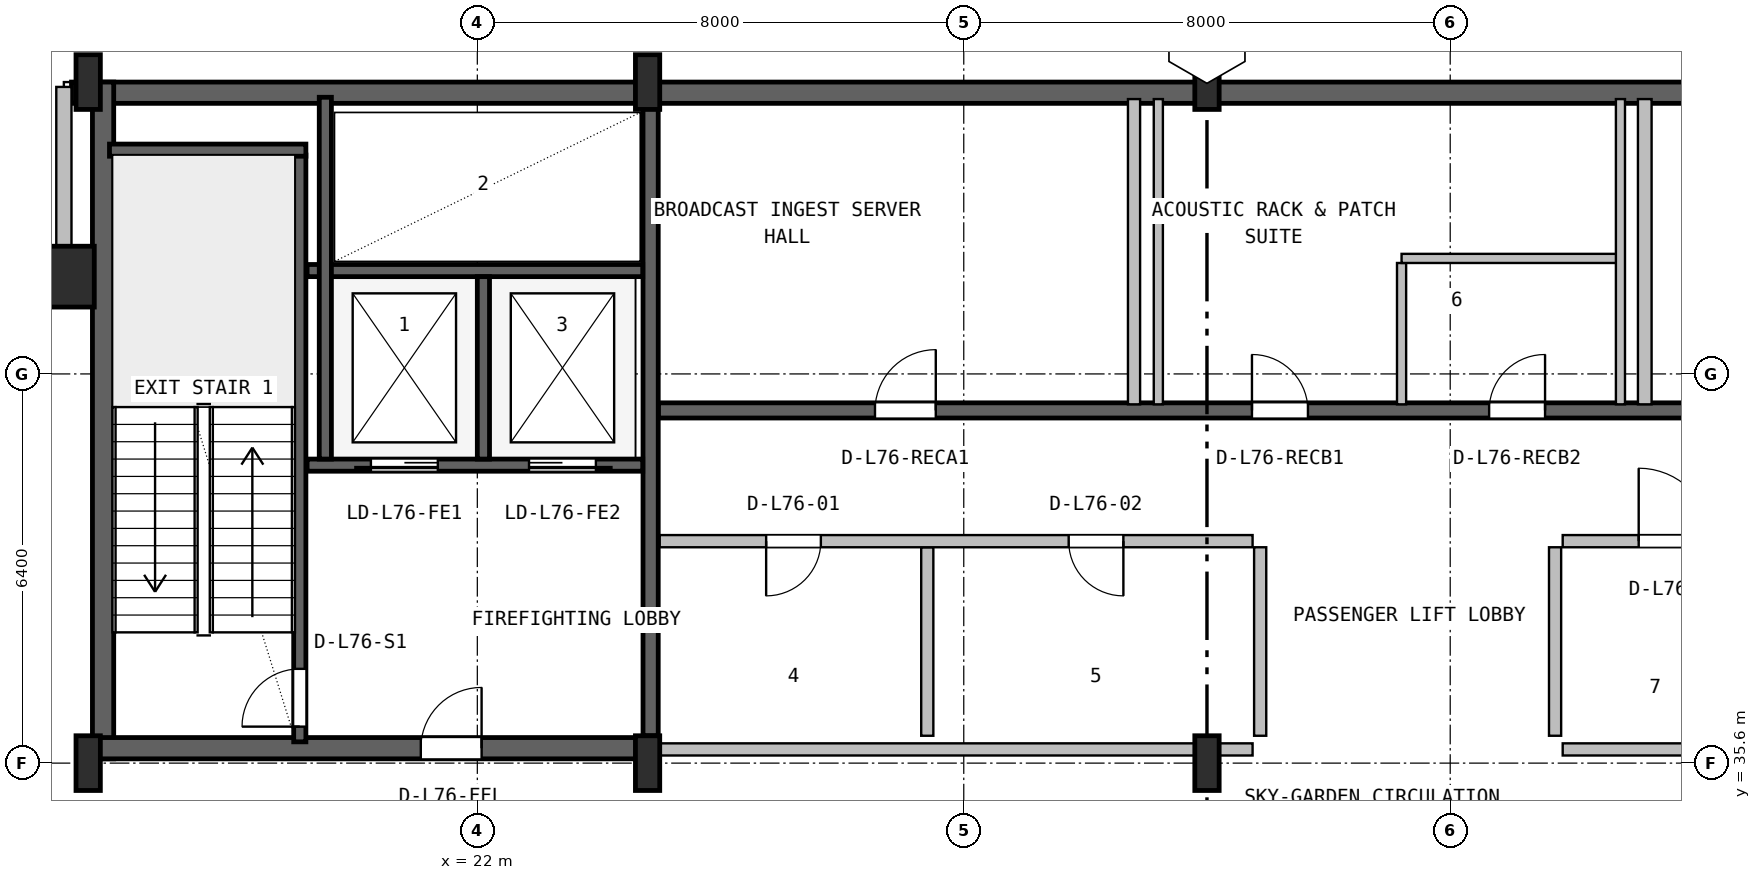
"""IFC4 building model, lengths in metres.
Left out: names, types, materials, properties, quantities, classifications, styles, units other than length and angle.
Written with IfcOpenShell. Run it as: python <this file> out.ifc"""

import sys

from ifc_helpers import new_model, si_unit, direction, frame, frame_2d, origin, origin_2d, place, context, subcontext, project, spatial, rectangle, hollow_rectangle, i_section, extrude, source, transform, mapped, element, fill, save


model = new_model("IFC4")
c1 = context("Model", 3, precision=1e-05, world=origin(), true_north=direction((0.0, 1.0)))
c2 = subcontext(c1, "Body", "Model", "MODEL_VIEW")
j1 = project(units=[si_unit("LENGTHUNIT", "METRE"), si_unit("PLANEANGLEUNIT", "RADIAN")], contexts=[c1])
p1 = place(None, origin())
s1 = spatial("IfcSite", under=j1, at=p1, CompositionType="ELEMENT")
p2 = place(p1, origin())
s2 = spatial("IfcBuilding", under=s1, at=p2, CompositionType="ELEMENT")
p3 = place(p2, frame((0.0, 0.0, 305.0)))
s3 = spatial("IfcBuildingStorey", under=s2, at=p3, CompositionType="ELEMENT", Elevation=305.0)
p4 = place(p3, frame((15.325, 46.625, 0.0), z_axis=(0.0, 0.0, 1.0), x_axis=(1.0, 0.0, 0.0)))
e1 = element("IfcWall", 1, at=p4, inside=s3, PredefinedType="SHEAR", context=c2, shape_type="SweptSolid", body=[
    extrude(rectangle(XDim=37.35, YDim=0.35, at=frame_2d((18.675, 0.0))), origin(), (0.0, 0.0, 1.0), 4.52),
])
p5 = place(p3, frame((15.845, 35.67, 0.0), z_axis=(0.0, 0.0, 1.0), x_axis=(0.0, 1.0, 0.0)))
e2 = element("IfcWall", 2, at=p5, inside=s3, PredefinedType="SHEAR", context=c2, shape_type="SweptSolid", body=[
    extrude(rectangle(XDim=11.13, YDim=0.35, at=frame_2d((5.565, 0.0))), origin(), (0.0, 0.0, 1.0), 4.52),
])
p6 = place(p3, frame((15.67, 35.845, 0.0), z_axis=(0.0, 0.0, 1.0), x_axis=(1.0, 0.0, 0.0)))
e3 = element("IfcWall", 3, at=p6, inside=s3, PredefinedType="SHEAR", context=c2, shape_type="SweptSolid", body=[
    extrude(rectangle(XDim=9.13, YDim=0.35, at=frame_2d((4.565, 0.0))), origin(), (0.0, 0.0, 1.0), 4.52),
])
p7 = place(p6, frame((5.4, 0.0, 0.0)))
e4 = element("IfcOpeningElement", 4, at=p7, cuts=e3, PredefinedType="OPENING", context=c2, shape_type="SweptSolid", body=[
    extrude(rectangle(XDim=1.0, YDim=2.1, at=frame_2d((0.5, 1.05))), frame((0.0, 0.185, 0.0), z_axis=(0.0, -1.0, 0.0), x_axis=(1.0, 0.0, 0.0)), (0.0, 0.0, 1.0), 0.37),
])
m1 = source(origin(), c2, "Body", "SweptSolid", [
    extrude(i_section(OverallWidth=0.4, OverallDepth=0.9, WebThickness=0.016, FlangeThickness=0.028, FilletRadius=0.016, at=origin_2d()), origin(), (0.0, 0.0, 1.0), 4.8),
])
for number, where, z_axis, x_axis in (
    (5, (15.6, 35.6, 0.0), (0.0, 0.0, 1.0), (1.0, 0.0, 0.0)),
    (6, (15.6, 46.8, 0.0), (0.0, 0.0, 1.0), (1.0, 0.0, 0.0)),
    (7, (24.8, 35.6, 0.0), (0.0, 0.0, 1.0), (1.0, 0.0, 0.0)),
    (8, (24.8, 46.8, 0.0), (0.0, 0.0, 1.0), (1.0, 0.0, 0.0)),
    (9, (34.0, 35.6, 0.0), (0.0, 0.0, 1.0), (1.0, 0.0, 0.0)),
    (10, (34.0, 46.8, 0.0), (0.0, 0.0, 1.0), (1.0, 0.0, 0.0)),
):
    element("IfcColumn", number, at=place(p3, frame(where, z_axis=z_axis, x_axis=x_axis)), inside=s3, PredefinedType="COLUMN", context=c2, shape_type="MappedRepresentation", body=[
        mapped(m1, transform((0.0, 0.0, 0.0), x_axis=(1.0, 0.0, 0.0), y_axis=(0.0, 1.0, 0.0), z_axis=(0.0, 0.0, 1.0), scale=1.0)),
    ])
m2 = source(origin(), c2, "Body", "SweptSolid", [
    extrude(hollow_rectangle(XDim=1.0, YDim=1.0, WallThickness=0.04, at=origin_2d()), origin(), (0.0, 0.0, 1.0), 4.8),
])
p8 = place(p3, frame((15.2, 43.6, 0.0), z_axis=(0.0, 0.0, 1.0), x_axis=(1.0, 0.0, 0.0)))
e11 = element("IfcColumn", 11, at=p8, inside=s3, PredefinedType="COLUMN", context=c2, shape_type="MappedRepresentation", body=[
    mapped(m2, transform((0.0, 0.0, 0.0), x_axis=(1.0, 0.0, 0.0), y_axis=(0.0, 1.0, 0.0), z_axis=(0.0, 0.0, 1.0), scale=1.0)),
])
p9 = place(p3, frame((12.08, 43.6, 0.0), z_axis=(0.0, 0.0, 1.0), x_axis=(1.0, 0.0, 0.0)))
e12 = element("IfcWall", 12, at=p9, inside=s3, PredefinedType="SOLIDWALL", context=c2, shape_type="SweptSolid", body=[
    extrude(rectangle(XDim=2.99, YDim=0.25, at=frame_2d((1.495, 0.0))), origin(), (0.0, 0.0, 1.0), 4.5),
])
p10 = place(p3, frame((15.2, 43.52, 0.0), z_axis=(0.0, 0.0, 1.0), x_axis=(0.0, 1.0, 0.0)))
e13 = element("IfcWall", 13, at=p10, inside=s3, PredefinedType="SOLIDWALL", context=c2, shape_type="SweptSolid", body=[
    extrude(rectangle(XDim=3.2, YDim=0.25, at=frame_2d((1.6, 0.0))), origin(), (0.0, 0.0, 1.0), 4.141),
])
p11 = place(p3, frame((19.08, 35.95, 0.0), z_axis=(0.0, 0.0, 1.0), x_axis=(0.0, 1.0, 0.0)))
e14 = element("IfcWall", 14, at=p11, inside=s3, PredefinedType="SHEAR", context=c2, shape_type="SweptSolid", body=[
    extrude(rectangle(XDim=9.65, YDim=0.2, at=frame_2d((4.825, 0.0))), origin(), (0.0, 0.0, 1.0), 4.52),
])
p12 = place(p11, frame((0.25, 0.0, 0.0)))
e15 = element("IfcOpeningElement", 15, at=p12, cuts=e14, PredefinedType="OPENING", context=c2, shape_type="SweptSolid", body=[
    extrude(rectangle(XDim=0.95, YDim=2.1, at=frame_2d((0.475, 1.05))), frame((0.0, 0.11, 0.0), z_axis=(0.0, -1.0, 0.0), x_axis=(1.0, 0.0, 0.0)), (0.0, 0.0, 1.0), 0.22),
])
p13 = place(p3, frame((15.95, 45.68, 0.0), z_axis=(0.0, 0.0, 1.0), x_axis=(1.0, 0.0, 0.0)))
e16 = element("IfcWall", 16, at=p13, inside=s3, PredefinedType="SHEAR", context=c2, shape_type="SweptSolid", body=[
    extrude(rectangle(XDim=3.23, YDim=0.2, at=frame_2d((1.615, 0.0))), origin(), (0.0, 0.0, 1.0), 4.52),
])
p14 = place(p3, frame((24.85, 36.05, 0.0), z_axis=(0.0, 0.0, 1.0), x_axis=(0.0, 1.0, 0.0)))
e17 = element("IfcWall", 17, at=p14, inside=s3, PredefinedType="SHEAR", context=c2, shape_type="SweptSolid", body=[
    extrude(rectangle(XDim=10.45, YDim=0.25, at=frame_2d((5.225, 0.0))), origin(), (0.0, 0.0, 1.0), 4.52),
])
p15 = place(p3, frame((19.2, 40.5, 0.0), z_axis=(0.0, 0.0, 1.0), x_axis=(1.0, 0.0, 0.0)))
e18 = element("IfcWall", 18, at=p15, inside=s3, PredefinedType="SHEAR", context=c2, shape_type="SweptSolid", body=[
    extrude(rectangle(XDim=5.52, YDim=0.2, at=frame_2d((2.76, 0.0))), origin(), (0.0, 0.0, 1.0), 4.52),
])
p16 = place(p15, frame((1.05, 0.0, 0.0)))
e19 = element("IfcOpeningElement", 19, at=p16, cuts=e18, PredefinedType="OPENING", context=c2, shape_type="SweptSolid", body=[
    extrude(rectangle(XDim=1.1, YDim=2.18, at=frame_2d((0.55, 1.09))), frame((0.0, 0.11, 0.0), z_axis=(0.0, -1.0, 0.0), x_axis=(1.0, 0.0, 0.0)), (0.0, 0.0, 1.0), 0.22),
])
p17 = place(p15, frame((3.65, 0.0, 0.0)))
e20 = element("IfcOpeningElement", 20, at=p17, cuts=e18, PredefinedType="OPENING", context=c2, shape_type="SweptSolid", body=[
    extrude(rectangle(XDim=1.1, YDim=2.18, at=frame_2d((0.55, 1.09))), frame((0.0, 0.11, 0.0), z_axis=(0.0, -1.0, 0.0), x_axis=(1.0, 0.0, 0.0)), (0.0, 0.0, 1.0), 0.22),
])
p18 = place(p3, frame((19.2, 43.7, 0.0), z_axis=(0.0, 0.0, 1.0), x_axis=(1.0, 0.0, 0.0)))
e21 = element("IfcWall", 21, at=p18, inside=s3, PredefinedType="SHEAR", context=c2, shape_type="SweptSolid", body=[
    extrude(rectangle(XDim=5.52, YDim=0.2, at=frame_2d((2.76, 0.0))), origin(), (0.0, 0.0, 1.0), 4.52),
])
p19 = place(p3, frame((22.1, 40.6, 0.0), z_axis=(0.0, 0.0, 1.0), x_axis=(0.0, 1.0, 0.0)))
e22 = element("IfcWall", 22, at=p19, inside=s3, PredefinedType="SHEAR", context=c2, shape_type="SweptSolid", body=[
    extrude(rectangle(XDim=3.0, YDim=0.2, at=frame_2d((1.5, 0.0))), origin(), (0.0, 0.0, 1.0), 4.52),
])
p20 = place(p3, frame((19.5, 40.6, 0.0), z_axis=(0.0, 0.0, 1.0), x_axis=(0.0, 1.0, 0.0)))
e23 = element("IfcWall", 23, at=p20, inside=s3, PredefinedType="SHEAR", context=c2, shape_type="SweptSolid", body=[
    extrude(rectangle(XDim=5.95, YDim=0.2, at=frame_2d((2.975, 0.0))), origin(), (0.0, 0.0, 1.0), 4.52),
])
p21 = place(p3, frame((24.98, 41.4, 0.0), z_axis=(0.0, 0.0, 1.0), x_axis=(1.0, 0.0, 0.0)))
e24 = element("IfcWall", 24, at=p21, inside=s3, PredefinedType="SHEAR", context=c2, shape_type="SweptSolid", body=[
    extrude(rectangle(XDim=23.82, YDim=0.25, at=frame_2d((11.91, 0.0))), origin(), (0.0, 0.0, 1.0), 4.52),
])
p22 = place(p21, frame((3.56, 0.0, 0.0)))
e25 = element("IfcOpeningElement", 25, at=p22, cuts=e24, PredefinedType="OPENING", context=c2, shape_type="SweptSolid", body=[
    extrude(rectangle(XDim=1.0, YDim=2.08, at=frame_2d((0.5, 1.04))), frame((0.0, 0.135, 0.0), z_axis=(0.0, -1.0, 0.0), x_axis=(1.0, 0.0, 0.0)), (0.0, 0.0, 1.0), 0.27),
])
p23 = place(p21, frame((9.76, 0.0, 0.0)))
e26 = element("IfcOpeningElement", 26, at=p23, cuts=e24, PredefinedType="OPENING", context=c2, shape_type="SweptSolid", body=[
    extrude(rectangle(XDim=0.92, YDim=2.08, at=frame_2d((0.46, 1.04))), frame((0.0, 0.135, 0.0), z_axis=(0.0, -1.0, 0.0), x_axis=(1.0, 0.0, 0.0)), (0.0, 0.0, 1.0), 0.27),
])
p24 = place(p21, frame((13.66, 0.0, 0.0)))
e27 = element("IfcOpeningElement", 27, at=p24, cuts=e24, PredefinedType="OPENING", context=c2, shape_type="SweptSolid", body=[
    extrude(rectangle(XDim=0.92, YDim=2.08, at=frame_2d((0.46, 1.04))), frame((0.0, 0.135, 0.0), z_axis=(0.0, -1.0, 0.0), x_axis=(1.0, 0.0, 0.0)), (0.0, 0.0, 1.0), 0.27),
])
p25 = place(p21, frame((19.56, 0.0, 0.0)))
e28 = element("IfcOpeningElement", 28, at=p25, cuts=e24, PredefinedType="OPENING", context=c2, shape_type="SweptSolid", body=[
    extrude(rectangle(XDim=0.92, YDim=2.08, at=frame_2d((0.46, 1.04))), frame((0.0, 0.135, 0.0), z_axis=(0.0, -1.0, 0.0), x_axis=(1.0, 0.0, 0.0)), (0.0, 0.0, 1.0), 0.27),
])
p26 = place(p3, frame((25.0, 35.825, 0.0), z_axis=(0.0, 0.0, 1.0), x_axis=(1.0, 0.0, 0.0)))
e29 = element("IfcWall", 29, at=p26, inside=s3, PredefinedType="PLUMBINGWALL", context=c2, shape_type="SweptSolid", body=[
    extrude(rectangle(XDim=9.75, YDim=0.2, at=frame_2d((4.875, 0.0))), origin(), (0.0, 0.0, 1.0), 3.545),
])
p27 = place(p3, frame((29.4, 36.05, 0.0), z_axis=(0.0, 0.0, 1.0), x_axis=(0.0, 1.0, 0.0)))
e30 = element("IfcWall", 30, at=p27, inside=s3, PredefinedType="PLUMBINGWALL", context=c2, shape_type="SweptSolid", body=[
    extrude(rectangle(XDim=3.1, YDim=0.2, at=frame_2d((1.55, 0.0))), origin(), (0.0, 0.0, 1.0), 4.5),
])
p28 = place(p3, frame((25.0, 39.25, 0.0), z_axis=(0.0, 0.0, 1.0), x_axis=(1.0, 0.0, 0.0)))
e31 = element("IfcWall", 31, at=p28, inside=s3, PredefinedType="PLUMBINGWALL", context=c2, shape_type="SweptSolid", body=[
    extrude(rectangle(XDim=9.75, YDim=0.2, at=frame_2d((4.875, 0.0))), origin(), (0.0, 0.0, 1.0), 4.5),
])
p29 = place(p28, frame((1.75, 0.0, 0.0)))
e32 = element("IfcOpeningElement", 32, at=p29, cuts=e31, PredefinedType="OPENING", context=c2, shape_type="SweptSolid", body=[
    extrude(rectangle(XDim=0.9, YDim=2.06, at=frame_2d((0.45, 1.03))), frame((0.0, 0.11, 0.0), z_axis=(0.0, -1.0, 0.0), x_axis=(1.0, 0.0, 0.0)), (0.0, 0.0, 1.0), 0.22),
])
p30 = place(p28, frame((6.725, 0.0, 0.0)))
e33 = element("IfcOpeningElement", 33, at=p30, cuts=e31, PredefinedType="OPENING", context=c2, shape_type="SweptSolid", body=[
    extrude(rectangle(XDim=0.9, YDim=2.06, at=frame_2d((0.45, 1.03))), frame((0.0, 0.11, 0.0), z_axis=(0.0, -1.0, 0.0), x_axis=(1.0, 0.0, 0.0)), (0.0, 0.0, 1.0), 0.22),
])
p31 = place(p3, frame((34.875, 36.05, 0.0), z_axis=(0.0, 0.0, 1.0), x_axis=(0.0, 1.0, 0.0)))
e34 = element("IfcWall", 34, at=p31, inside=s3, PredefinedType="PLUMBINGWALL", context=c2, shape_type="SweptSolid", body=[
    extrude(rectangle(XDim=3.1, YDim=0.2, at=frame_2d((1.55, 0.0))), origin(), (0.0, 0.0, 1.0), 4.5),
])
p32 = place(p3, frame((39.85, 35.825, 0.0), z_axis=(0.0, 0.0, 1.0), x_axis=(1.0, 0.0, 0.0)))
e35 = element("IfcWall", 35, at=p32, inside=s3, PredefinedType="SOLIDWALL", context=c2, shape_type="SweptSolid", body=[
    extrude(rectangle(XDim=3.7, YDim=0.2, at=frame_2d((1.85, 0.0))), origin(), (0.0, 0.0, 1.0), 3.545),
])
p33 = place(p3, frame((39.85, 39.25, 0.0), z_axis=(0.0, 0.0, 1.0), x_axis=(1.0, 0.0, 0.0)))
e36 = element("IfcWall", 36, at=p33, inside=s3, PredefinedType="SOLIDWALL", context=c2, shape_type="SweptSolid", body=[
    extrude(rectangle(XDim=3.7, YDim=0.2, at=frame_2d((1.85, 0.0))), origin(), (0.0, 0.0, 1.0), 4.5),
])
p34 = place(p33, frame((1.25, 0.0, 0.0)))
e37 = element("IfcOpeningElement", 37, at=p34, cuts=e36, PredefinedType="OPENING", context=c2, shape_type="SweptSolid", body=[
    extrude(rectangle(XDim=1.2, YDim=2.1, at=frame_2d((0.6, 1.05))), frame((0.0, 0.11, 0.0), z_axis=(0.0, -1.0, 0.0), x_axis=(1.0, 0.0, 0.0)), (0.0, 0.0, 1.0), 0.22),
])
p35 = place(p3, frame((39.725, 36.05, 0.0), z_axis=(0.0, 0.0, 1.0), x_axis=(0.0, 1.0, 0.0)))
e38 = element("IfcWall", 38, at=p35, inside=s3, PredefinedType="SOLIDWALL", context=c2, shape_type="SweptSolid", body=[
    extrude(rectangle(XDim=3.1, YDim=0.2, at=frame_2d((1.55, 0.0))), origin(), (0.0, 0.0, 1.0), 4.5),
])
p36 = place(p3, frame((32.8, 41.5, 0.0), z_axis=(0.0, 0.0, 1.0), x_axis=(0.0, 1.0, 0.0)))
e39 = element("IfcWall", 39, at=p36, inside=s3, PredefinedType="SOLIDWALL", context=c2, shape_type="SweptSolid", body=[
    extrude(rectangle(XDim=5.02, YDim=0.2, at=frame_2d((2.51, 0.0))), origin(), (0.0, 0.0, 1.0), 4.5),
])
p37 = place(p3, frame((37.2, 41.5, 0.0), z_axis=(0.0, 0.0, 1.0), x_axis=(0.0, 1.0, 0.0)))
e40 = element("IfcWall", 40, at=p37, inside=s3, PredefinedType="PARTITIONING", context=c2, shape_type="SweptSolid", body=[
    extrude(rectangle(XDim=2.325, YDim=0.15, at=frame_2d((1.163, 0.0))), origin(), (0.0, 0.0, 1.0), 4.5),
])
p38 = place(p3, frame((37.2, 43.9, 0.0), z_axis=(0.0, 0.0, 1.0), x_axis=(1.0, 0.0, 0.0)))
e41 = element("IfcWall", 41, at=p38, inside=s3, PredefinedType="PARTITIONING", context=c2, shape_type="SweptSolid", body=[
    extrude(rectangle(XDim=3.6, YDim=0.15, at=frame_2d((1.8, 0.0))), origin(), (0.0, 0.0, 1.0), 4.5),
])
for number, where, z_axis, x_axis in (
    (42, (40.8, 41.5, 0.0), (0.0, 0.0, 1.0), (0.0, 1.0, 0.0)),
    (43, (33.2, 41.5, 0.0), (0.0, 0.0, 1.0), (0.0, 1.0, 0.0)),
):
    element("IfcWall", number, at=place(p3, frame(where, z_axis=z_axis, x_axis=x_axis)), inside=s3, PredefinedType="PARTITIONING", context=c2, shape_type="SweptSolid", body=[
        extrude(rectangle(XDim=5.02, YDim=0.15, at=frame_2d((2.51, 0.0))), origin(), (0.0, 0.0, 1.0), 4.5),
    ])
p39 = place(p3, frame((41.2, 41.5, 0.0), z_axis=(0.0, 0.0, 1.0), x_axis=(0.0, 1.0, 0.0)))
e44 = element("IfcWall", 44, at=p39, inside=s3, PredefinedType="PARTITIONING", context=c2, shape_type="SweptSolid", body=[
    extrude(rectangle(XDim=5.02, YDim=0.225, at=frame_2d((2.51, 0.0))), origin(), (0.0, 0.0, 1.0), 4.5),
])
m3 = source(origin(), c2, "Body", "SweptSolid", [
    extrude(rectangle(XDim=0.95, YDim=2.1, at=frame_2d((0.475, 1.05))), frame((0.0, 0.025, 0.0), z_axis=(0.0, -1.0, 0.0), x_axis=(1.0, 0.0, 0.0)), (0.0, 0.0, 1.0), 0.05),
])
p40 = place(p12, origin())
e45 = element("IfcDoor", 45, at=p40, inside=s3, OperationType="SINGLE_SWING_LEFT", PredefinedType="DOOR", context=c2, shape_type="MappedRepresentation", body=[
    mapped(m3, transform((0.0, 0.0, 0.0), x_axis=(1.0, 0.0, 0.0), y_axis=(0.0, 1.0, 0.0), z_axis=(0.0, 0.0, 1.0), scale=1.0)),
])
fill(e15, e45)
m4 = source(origin(), c2, "Body", "SweptSolid", [
    extrude(rectangle(XDim=1.0, YDim=2.1, at=frame_2d((0.5, 1.05))), frame((0.0, 0.025, 0.0), z_axis=(0.0, -1.0, 0.0), x_axis=(1.0, 0.0, 0.0)), (0.0, 0.0, 1.0), 0.05),
])
p41 = place(p7, origin())
e46 = element("IfcDoor", 46, at=p41, inside=s3, OperationType="SINGLE_SWING_RIGHT", PredefinedType="DOOR", context=c2, shape_type="MappedRepresentation", body=[
    mapped(m4, transform((0.0, 0.0, 0.0), x_axis=(1.0, 0.0, 0.0), y_axis=(0.0, 1.0, 0.0), z_axis=(0.0, 0.0, 1.0), scale=1.0)),
])
fill(e4, e46)
m5 = source(origin(), c2, "Body", "SweptSolid", [
    extrude(rectangle(XDim=1.1, YDim=2.18, at=frame_2d((0.55, 1.09))), frame((0.0, 0.025, 0.0), z_axis=(0.0, -1.0, 0.0), x_axis=(1.0, 0.0, 0.0)), (0.0, 0.0, 1.0), 0.05),
])
p42 = place(p16, frame((1.1, 0.0, 0.0), z_axis=(0.0, 0.0, 1.0), x_axis=(-1.0, 0.0, 0.0)))
e47 = element("IfcDoor", 47, at=p42, inside=s3, OperationType="SLIDING_TO_LEFT", PredefinedType="DOOR", context=c2, shape_type="MappedRepresentation", body=[
    mapped(m5, transform((0.0, 0.0, 0.0), x_axis=(1.0, 0.0, 0.0), y_axis=(0.0, 1.0, 0.0), z_axis=(0.0, 0.0, 1.0), scale=1.0)),
])
fill(e19, e47)
p43 = place(p17, frame((1.1, 0.0, 0.0), z_axis=(0.0, 0.0, 1.0), x_axis=(-1.0, 0.0, 0.0)))
e48 = element("IfcDoor", 48, at=p43, inside=s3, OperationType="SLIDING_TO_RIGHT", PredefinedType="DOOR", context=c2, shape_type="MappedRepresentation", body=[
    mapped(m5, transform((0.0, 0.0, 0.0), x_axis=(1.0, 0.0, 0.0), y_axis=(0.0, 1.0, 0.0), z_axis=(0.0, 0.0, 1.0), scale=1.0)),
])
fill(e20, e48)
m6 = source(origin(), c2, "Body", "SweptSolid", [
    extrude(rectangle(XDim=1.0, YDim=2.08, at=frame_2d((0.5, 1.04))), frame((0.0, 0.025, 0.0), z_axis=(0.0, -1.0, 0.0), x_axis=(1.0, 0.0, 0.0)), (0.0, 0.0, 1.0), 0.05),
])
p44 = place(p22, origin())
e49 = element("IfcDoor", 49, at=p44, inside=s3, OperationType="SINGLE_SWING_RIGHT", PredefinedType="DOOR", context=c2, shape_type="MappedRepresentation", body=[
    mapped(m6, transform((0.0, 0.0, 0.0), x_axis=(1.0, 0.0, 0.0), y_axis=(0.0, 1.0, 0.0), z_axis=(0.0, 0.0, 1.0), scale=1.0)),
])
fill(e25, e49)
m7 = source(origin(), c2, "Body", "SweptSolid", [
    extrude(rectangle(XDim=0.92, YDim=2.08, at=frame_2d((0.46, 1.04))), frame((0.0, 0.025, 0.0), z_axis=(0.0, -1.0, 0.0), x_axis=(1.0, 0.0, 0.0)), (0.0, 0.0, 1.0), 0.05),
])
p45 = place(p23, origin())
e50 = element("IfcDoor", 50, at=p45, inside=s3, OperationType="SINGLE_SWING_LEFT", PredefinedType="DOOR", context=c2, shape_type="MappedRepresentation", body=[
    mapped(m7, transform((0.0, 0.0, 0.0), x_axis=(1.0, 0.0, 0.0), y_axis=(0.0, 1.0, 0.0), z_axis=(0.0, 0.0, 1.0), scale=1.0)),
])
fill(e26, e50)
p46 = place(p24, origin())
e51 = element("IfcDoor", 51, at=p46, inside=s3, OperationType="SINGLE_SWING_RIGHT", PredefinedType="DOOR", context=c2, shape_type="MappedRepresentation", body=[
    mapped(m7, transform((0.0, 0.0, 0.0), x_axis=(1.0, 0.0, 0.0), y_axis=(0.0, 1.0, 0.0), z_axis=(0.0, 0.0, 1.0), scale=1.0)),
])
fill(e27, e51)
m8 = source(origin(), c2, "Body", "SweptSolid", [
    extrude(rectangle(XDim=0.9, YDim=2.06, at=frame_2d((0.45, 1.03))), frame((0.0, 0.025, 0.0), z_axis=(0.0, -1.0, 0.0), x_axis=(1.0, 0.0, 0.0)), (0.0, 0.0, 1.0), 0.05),
])
p47 = place(p29, frame((0.9, 0.0, 0.0), z_axis=(0.0, 0.0, 1.0), x_axis=(-1.0, 0.0, 0.0)))
e52 = element("IfcDoor", 52, at=p47, inside=s3, OperationType="SINGLE_SWING_LEFT", PredefinedType="DOOR", context=c2, shape_type="MappedRepresentation", body=[
    mapped(m8, transform((0.0, 0.0, 0.0), x_axis=(1.0, 0.0, 0.0), y_axis=(0.0, 1.0, 0.0), z_axis=(0.0, 0.0, 1.0), scale=1.0)),
])
fill(e32, e52)
p48 = place(p30, frame((0.9, 0.0, 0.0), z_axis=(0.0, 0.0, 1.0), x_axis=(-1.0, 0.0, 0.0)))
e53 = element("IfcDoor", 53, at=p48, inside=s3, OperationType="SINGLE_SWING_RIGHT", PredefinedType="DOOR", context=c2, shape_type="MappedRepresentation", body=[
    mapped(m8, transform((0.0, 0.0, 0.0), x_axis=(1.0, 0.0, 0.0), y_axis=(0.0, 1.0, 0.0), z_axis=(0.0, 0.0, 1.0), scale=1.0)),
])
fill(e33, e53)
m9 = source(origin(), c2, "Body", "SweptSolid", [
    extrude(rectangle(XDim=1.2, YDim=2.1, at=frame_2d((0.6, 1.05))), frame((0.0, 0.025, 0.0), z_axis=(0.0, -1.0, 0.0), x_axis=(1.0, 0.0, 0.0)), (0.0, 0.0, 1.0), 0.05),
])
p49 = place(p34, origin())
e54 = element("IfcDoor", 54, at=p49, inside=s3, OperationType="SINGLE_SWING_LEFT", PredefinedType="DOOR", context=c2, shape_type="MappedRepresentation", body=[
    mapped(m9, transform((0.0, 0.0, 0.0), x_axis=(1.0, 0.0, 0.0), y_axis=(0.0, 1.0, 0.0), z_axis=(0.0, 0.0, 1.0), scale=1.0)),
])
fill(e37, e54)
save(model, sys.argv[1])
